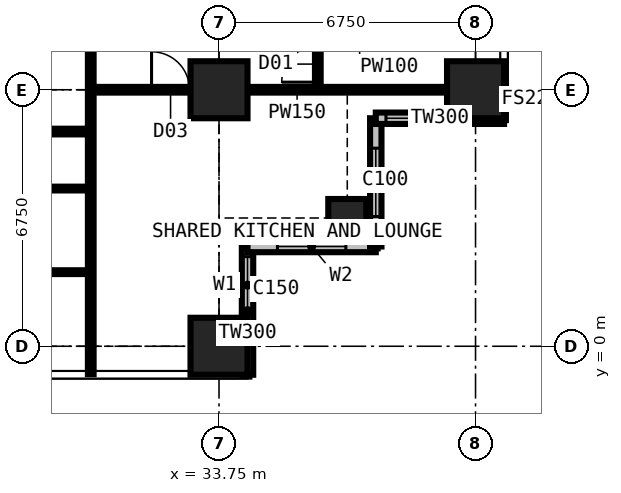
"""IFC4 building model, lengths in metres.
Left out: names, types, materials, properties, quantities, classifications, styles, units other than length and angle.
Written with IfcOpenShell. Run it as: python <this file> out.ifc"""

import sys

from ifc_helpers import new_model, si_unit, direction, frame, frame_2d, origin, origin_2d, place, context, subcontext, project, spatial, rectangle, extrude, element, fill, save


model = new_model("IFC4")
c1 = context("Model", 3, precision=1e-05, world=origin(), true_north=direction((0.0, 1.0)))
c2 = subcontext(c1, "Body", "Model", "MODEL_VIEW")
j1 = project(units=[si_unit("LENGTHUNIT", "METRE"), si_unit("PLANEANGLEUNIT", "RADIAN")], contexts=[c1])
p1 = place(None, origin())
s1 = spatial("IfcSite", under=j1, at=p1, CompositionType="ELEMENT")
p2 = place(p1, origin())
s2 = spatial("IfcBuilding", under=s1, at=p2, CompositionType="ELEMENT")
p3 = place(p2, frame((0.0, 0.0, 123.3)))
s3 = spatial("IfcBuildingStorey", under=s2, at=p3, CompositionType="ELEMENT", Elevation=123.3)
for number, where, z_axis, x_axis in (
    (1, (33.75, 0.0, 0.0), (0.0, 0.0, 1.0), (1.0, 0.0, 0.0)),
    (2, (33.75, 6.75, 0.0), (0.0, 0.0, 1.0), (1.0, 0.0, 0.0)),
):
    element("IfcColumn", number, at=place(p3, frame(where, z_axis=z_axis, x_axis=x_axis)), inside=s3, PredefinedType="COLUMN", context=c2, shape_type="SweptSolid", body=[
        extrude(rectangle(XDim=1.5, YDim=1.5, at=origin_2d()), origin(), (0.0, 0.0, 1.0), 3.6),
    ])
p4 = place(p3, frame((37.125, 3.375, 0.0), z_axis=(0.0, 0.0, 1.0), x_axis=(1.0, 0.0, 0.0)))
e3 = element("IfcColumn", 3, at=p4, inside=s3, PredefinedType="COLUMN", context=c2, shape_type="SweptSolid", body=[
    extrude(rectangle(XDim=1.0, YDim=1.0, at=origin_2d()), origin(), (0.0, 0.0, 1.0), 3.6),
])
p5 = place(p3, frame((40.5, 6.75, 0.0), z_axis=(0.0, 0.0, 1.0), x_axis=(1.0, 0.0, 0.0)))
e4 = element("IfcColumn", 4, at=p5, inside=s3, PredefinedType="COLUMN", context=c2, shape_type="SweptSolid", body=[
    extrude(rectangle(XDim=1.5, YDim=1.5, at=origin_2d()), origin(), (0.0, 0.0, 1.0), 3.6),
])
p6 = place(p3, frame((34.5, -0.75, 0.0), z_axis=(0.0, 0.0, 1.0), x_axis=(0.0, 1.0, 0.0)))
e5 = element("IfcWall", 5, at=p6, inside=s3, PredefinedType="SOLIDWALL", context=c2, shape_type="SweptSolid", body=[
    extrude(rectangle(XDim=3.375, YDim=0.3, at=frame_2d((1.688, 0.0))), origin(), (0.0, 0.0, 1.0), 3.375),
])
p7 = place(p6, frame((1.607, 0.0, 0.9)))
e6 = element("IfcOpeningElement", 6, at=p7, cuts=e5, PredefinedType="OPENING", context=c2, shape_type="SweptSolid", body=[
    extrude(rectangle(XDim=1.5, YDim=1.8, at=frame_2d((0.75, 0.9))), frame((0.0, 0.16, 0.0), z_axis=(0.0, -1.0, 0.0), x_axis=(1.0, 0.0, 0.0)), (0.0, 0.0, 1.0), 0.32),
])
p8 = place(p3, frame((34.5, 2.625, 0.0), z_axis=(0.0, 0.0, 1.0), x_axis=(1.0, 0.0, 0.0)))
e7 = element("IfcWall", 7, at=p8, inside=s3, PredefinedType="SOLIDWALL", context=c2, shape_type="SweptSolid", body=[
    extrude(rectangle(XDim=3.375, YDim=0.3, at=frame_2d((1.688, 0.0))), origin(), (0.0, 0.0, 1.0), 3.375),
])
p9 = place(p8, frame((0.788, 0.0, 0.6)))
e8 = element("IfcOpeningElement", 8, at=p9, cuts=e7, PredefinedType="OPENING", context=c2, shape_type="SweptSolid", body=[
    extrude(rectangle(XDim=1.8, YDim=2.1, at=frame_2d((0.9, 1.05))), frame((0.0, 0.16, 0.0), z_axis=(0.0, -1.0, 0.0), x_axis=(1.0, 0.0, 0.0)), (0.0, 0.0, 1.0), 0.32),
])
p10 = place(p3, frame((37.875, 2.625, 0.0), z_axis=(0.0, 0.0, 1.0), x_axis=(0.0, 1.0, 0.0)))
e9 = element("IfcWall", 9, at=p10, inside=s3, PredefinedType="SOLIDWALL", context=c2, shape_type="SweptSolid", body=[
    extrude(rectangle(XDim=3.375, YDim=0.3, at=frame_2d((1.688, 0.0))), origin(), (0.0, 0.0, 1.0), 3.375),
])
p11 = place(p10, frame((0.788, 0.0, 0.6)))
e10 = element("IfcOpeningElement", 10, at=p11, cuts=e9, PredefinedType="OPENING", context=c2, shape_type="SweptSolid", body=[
    extrude(rectangle(XDim=1.8, YDim=2.1, at=frame_2d((0.9, 1.05))), frame((0.0, 0.16, 0.0), z_axis=(0.0, -1.0, 0.0), x_axis=(1.0, 0.0, 0.0)), (0.0, 0.0, 1.0), 0.32),
])
p12 = place(p3, frame((37.875, 6.0, 0.0), z_axis=(0.0, 0.0, 1.0), x_axis=(1.0, 0.0, 0.0)))
e11 = element("IfcWall", 11, at=p12, inside=s3, PredefinedType="SOLIDWALL", context=c2, shape_type="SweptSolid", body=[
    extrude(rectangle(XDim=3.375, YDim=0.3, at=frame_2d((1.688, 0.0))), origin(), (0.0, 0.0, 1.0), 3.375),
])
p13 = place(p12, frame((0.268, 0.0, 0.9)))
e12 = element("IfcOpeningElement", 12, at=p13, cuts=e11, PredefinedType="OPENING", context=c2, shape_type="SweptSolid", body=[
    extrude(rectangle(XDim=1.5, YDim=1.8, at=frame_2d((0.75, 0.9))), frame((0.0, 0.16, 0.0), z_axis=(0.0, -1.0, 0.0), x_axis=(1.0, 0.0, 0.0)), (0.0, 0.0, 1.0), 0.32),
])
p14 = place(p3, frame((6.75, 4.15, 0.0), z_axis=(0.0, 0.0, 1.0), x_axis=(1.0, 0.0, 0.0)))
e13 = element("IfcWall", 13, at=p14, inside=s3, PredefinedType="PARTITIONING", context=c2, shape_type="SweptSolid", body=[
    extrude(rectangle(XDim=23.625, YDim=0.1, at=frame_2d((11.812, 0.0))), origin(), (0.0, 0.0, 1.0), 3.375),
])
p15 = place(p14, frame((2.85, 0.0, 0.0)))
e14 = element("IfcOpeningElement", 14, at=p15, cuts=e13, PredefinedType="OPENING", context=c2, shape_type="SweptSolid", body=[
    extrude(rectangle(XDim=1.0, YDim=2.2, at=frame_2d((0.5, 1.1))), frame((0.0, 0.06, 0.0), z_axis=(0.0, -1.0, 0.0), x_axis=(1.0, 0.0, 0.0)), (0.0, 0.0, 1.0), 0.12),
])
p16 = place(p14, frame((6.95, 0.0, 0.0)))
e15 = element("IfcOpeningElement", 15, at=p16, cuts=e13, PredefinedType="OPENING", context=c2, shape_type="SweptSolid", body=[
    extrude(rectangle(XDim=0.95, YDim=2.2, at=frame_2d((0.475, 1.1))), frame((0.0, 0.06, 0.0), z_axis=(0.0, -1.0, 0.0), x_axis=(1.0, 0.0, 0.0)), (0.0, 0.0, 1.0), 0.12),
])
p17 = place(p14, frame((10.375, 0.0, 0.0)))
e16 = element("IfcOpeningElement", 16, at=p17, cuts=e13, PredefinedType="OPENING", context=c2, shape_type="SweptSolid", body=[
    extrude(rectangle(XDim=0.95, YDim=2.2, at=frame_2d((0.475, 1.1))), frame((0.0, 0.06, 0.0), z_axis=(0.0, -1.0, 0.0), x_axis=(1.0, 0.0, 0.0)), (0.0, 0.0, 1.0), 0.12),
])
p18 = place(p14, frame((13.7, 0.0, 0.0)))
e17 = element("IfcOpeningElement", 17, at=p18, cuts=e13, PredefinedType="OPENING", context=c2, shape_type="SweptSolid", body=[
    extrude(rectangle(XDim=0.95, YDim=2.2, at=frame_2d((0.475, 1.1))), frame((0.0, 0.06, 0.0), z_axis=(0.0, -1.0, 0.0), x_axis=(1.0, 0.0, 0.0)), (0.0, 0.0, 1.0), 0.12),
])
p19 = place(p14, frame((17.125, 0.0, 0.0)))
e18 = element("IfcOpeningElement", 18, at=p19, cuts=e13, PredefinedType="OPENING", context=c2, shape_type="SweptSolid", body=[
    extrude(rectangle(XDim=0.95, YDim=2.2, at=frame_2d((0.475, 1.1))), frame((0.0, 0.06, 0.0), z_axis=(0.0, -1.0, 0.0), x_axis=(1.0, 0.0, 0.0)), (0.0, 0.0, 1.0), 0.12),
])
p20 = place(p14, frame((20.5, 0.0, 0.0)))
e19 = element("IfcOpeningElement", 19, at=p20, cuts=e13, PredefinedType="OPENING", context=c2, shape_type="SweptSolid", body=[
    extrude(rectangle(XDim=0.95, YDim=2.2, at=frame_2d((0.475, 1.1))), frame((0.0, 0.06, 0.0), z_axis=(0.0, -1.0, 0.0), x_axis=(1.0, 0.0, 0.0)), (0.0, 0.0, 1.0), 0.12),
])
p21 = place(p3, frame((22.988, 5.65, 0.0), z_axis=(0.0, 0.0, 1.0), x_axis=(1.0, 0.0, 0.0)))
e20 = element("IfcWall", 20, at=p21, inside=s3, PredefinedType="PARTITIONING", context=c2, shape_type="SweptSolid", body=[
    extrude(rectangle(XDim=7.387, YDim=0.15, at=frame_2d((3.694, 0.0))), origin(), (0.0, 0.0, 1.0), 3.375),
])
p22 = place(p21, frame((2.3, 0.0, 0.0)))
e21 = element("IfcOpeningElement", 21, at=p22, cuts=e20, PredefinedType="OPENING", context=c2, shape_type="SweptSolid", body=[
    extrude(rectangle(XDim=0.95, YDim=2.2, at=frame_2d((0.475, 1.1))), frame((0.0, 0.085, 0.0), z_axis=(0.0, -1.0, 0.0), x_axis=(1.0, 0.0, 0.0)), (0.0, 0.0, 1.0), 0.17),
])
p23 = place(p3, frame((28.375, 1.95, 0.0), z_axis=(0.0, 0.0, 1.0), x_axis=(1.0, 0.0, 0.0)))
e22 = element("IfcWall", 22, at=p23, inside=s3, PredefinedType="PARTITIONING", context=c2, shape_type="SweptSolid", body=[
    extrude(rectangle(XDim=2.0, YDim=0.1, at=frame_2d((1.0, 0.0))), origin(), (0.0, 0.0, 1.0), 3.375),
])
p24 = place(p3, frame((30.375, -0.734, 0.0), z_axis=(0.0, 0.0, 1.0), x_axis=(0.0, 1.0, 0.0)))
e23 = element("IfcWall", 23, at=p24, inside=s3, PredefinedType="PARTITIONING", context=c2, shape_type="SweptSolid", body=[
    extrude(rectangle(XDim=12.034, YDim=0.15, at=frame_2d((6.017, 0.0))), origin(), (0.0, 0.0, 1.0), 3.375),
])
p25 = place(p3, frame((30.375, 6.75, 0.0), z_axis=(0.0, 0.0, 1.0), x_axis=(1.0, 0.0, 0.0)))
e24 = element("IfcWall", 24, at=p25, inside=s3, PredefinedType="PARTITIONING", context=c2, shape_type="SweptSolid", body=[
    extrude(rectangle(XDim=10.859, YDim=0.15, at=frame_2d((5.429, 0.0))), origin(), (0.0, 0.0, 1.0), 2.877),
])
p26 = place(p25, frame((1.6, 0.0, 0.0)))
e25 = element("IfcOpeningElement", 25, at=p26, cuts=e24, PredefinedType="OPENING", context=c2, shape_type="SweptSolid", body=[
    extrude(rectangle(XDim=1.0, YDim=2.2, at=frame_2d((0.5, 1.1))), frame((0.0, 0.085, 0.0), z_axis=(0.0, -1.0, 0.0), x_axis=(1.0, 0.0, 0.0)), (0.0, 0.0, 1.0), 0.17),
])
p27 = place(p3, frame((36.35, 6.75, 0.0), z_axis=(0.0, 0.0, 1.0), x_axis=(0.0, 1.0, 0.0)))
e26 = element("IfcWall", 26, at=p27, inside=s3, PredefinedType="PARTITIONING", context=c2, shape_type="SweptSolid", body=[
    extrude(rectangle(XDim=20.25, YDim=0.15, at=frame_2d((10.125, 0.0))), origin(), (0.0, 0.0, 1.0), 3.375),
])
p28 = place(p27, frame((0.2, 0.0, 0.0)))
e27 = element("IfcOpeningElement", 27, at=p28, cuts=e26, PredefinedType="OPENING", context=c2, shape_type="SweptSolid", body=[
    extrude(rectangle(XDim=0.95, YDim=2.2, at=frame_2d((0.475, 1.1))), frame((0.0, 0.085, 0.0), z_axis=(0.0, -1.0, 0.0), x_axis=(1.0, 0.0, 0.0)), (0.0, 0.0, 1.0), 0.17),
])
p29 = place(p27, frame((15.1, 0.0, 0.0)))
e28 = element("IfcOpeningElement", 28, at=p29, cuts=e26, PredefinedType="OPENING", context=c2, shape_type="SweptSolid", body=[
    extrude(rectangle(XDim=0.95, YDim=2.2, at=frame_2d((0.475, 1.1))), frame((0.0, 0.085, 0.0), z_axis=(0.0, -1.0, 0.0), x_axis=(1.0, 0.0, 0.0)), (0.0, 0.0, 1.0), 0.17),
])
p30 = place(p27, frame((8.35, 0.0, 0.0)))
e29 = element("IfcOpeningElement", 29, at=p30, cuts=e26, PredefinedType="OPENING", context=c2, shape_type="SweptSolid", body=[
    extrude(rectangle(XDim=0.95, YDim=2.2, at=frame_2d((0.475, 1.1))), frame((0.0, 0.085, 0.0), z_axis=(0.0, -1.0, 0.0), x_axis=(1.0, 0.0, 0.0)), (0.0, 0.0, 1.0), 0.17),
])
p31 = place(p27, frame((3.575, 0.0, 0.0)))
e30 = element("IfcOpeningElement", 30, at=p31, cuts=e26, PredefinedType="OPENING", context=c2, shape_type="SweptSolid", body=[
    extrude(rectangle(XDim=0.95, YDim=2.2, at=frame_2d((0.475, 1.1))), frame((0.0, 0.085, 0.0), z_axis=(0.0, -1.0, 0.0), x_axis=(1.0, 0.0, 0.0)), (0.0, 0.0, 1.0), 0.17),
])
p32 = place(p7, origin())
e31 = element("IfcWindow", 31, at=p32, inside=s3, PartitioningType="SINGLE_PANEL", PredefinedType="WINDOW", context=c2, shape_type="SweptSolid", body=[
    extrude(rectangle(XDim=1.5, YDim=1.8, at=frame_2d((0.75, 0.9))), frame((0.0, 0.03, 0.0), z_axis=(0.0, -1.0, 0.0), x_axis=(1.0, 0.0, 0.0)), (0.0, 0.0, 1.0), 0.06),
])
fill(e6, e31)
p33 = place(p9, origin())
e32 = element("IfcWindow", 32, at=p33, inside=s3, PartitioningType="SINGLE_PANEL", PredefinedType="WINDOW", context=c2, shape_type="SweptSolid", body=[
    extrude(rectangle(XDim=1.8, YDim=2.1, at=frame_2d((0.9, 1.05))), frame((0.0, 0.03, 0.0), z_axis=(0.0, -1.0, 0.0), x_axis=(1.0, 0.0, 0.0)), (0.0, 0.0, 1.0), 0.06),
])
fill(e8, e32)
p34 = place(p11, origin())
e33 = element("IfcWindow", 33, at=p34, inside=s3, PartitioningType="SINGLE_PANEL", PredefinedType="WINDOW", context=c2, shape_type="SweptSolid", body=[
    extrude(rectangle(XDim=1.8, YDim=2.1, at=frame_2d((0.9, 1.05))), frame((0.0, 0.03, 0.0), z_axis=(0.0, -1.0, 0.0), x_axis=(1.0, 0.0, 0.0)), (0.0, 0.0, 1.0), 0.06),
])
fill(e10, e33)
p35 = place(p13, origin())
e34 = element("IfcWindow", 34, at=p35, inside=s3, PartitioningType="SINGLE_PANEL", PredefinedType="WINDOW", context=c2, shape_type="SweptSolid", body=[
    extrude(rectangle(XDim=1.5, YDim=1.8, at=frame_2d((0.75, 0.9))), frame((0.0, 0.03, 0.0), z_axis=(0.0, -1.0, 0.0), x_axis=(1.0, 0.0, 0.0)), (0.0, 0.0, 1.0), 0.06),
])
fill(e12, e34)
p36 = place(p26, origin())
e35 = element("IfcDoor", 35, at=p36, inside=s3, OperationType="SINGLE_SWING_LEFT", PredefinedType="DOOR", context=c2, shape_type="SweptSolid", body=[
    extrude(rectangle(XDim=1.0, YDim=2.2, at=frame_2d((0.5, 1.1))), frame((0.0, 0.025, 0.0), z_axis=(0.0, -1.0, 0.0), x_axis=(1.0, 0.0, 0.0)), (0.0, 0.0, 1.0), 0.05),
])
fill(e25, e35)
p37 = place(p28, origin())
e36 = element("IfcDoor", 36, at=p37, inside=s3, OperationType="SINGLE_SWING_LEFT", PredefinedType="DOOR", context=c2, shape_type="SweptSolid", body=[
    extrude(rectangle(XDim=0.95, YDim=2.2, at=frame_2d((0.475, 1.1))), frame((0.0, 0.025, 0.0), z_axis=(0.0, -1.0, 0.0), x_axis=(1.0, 0.0, 0.0)), (0.0, 0.0, 1.0), 0.05),
])
fill(e27, e36)
save(model, sys.argv[1])
